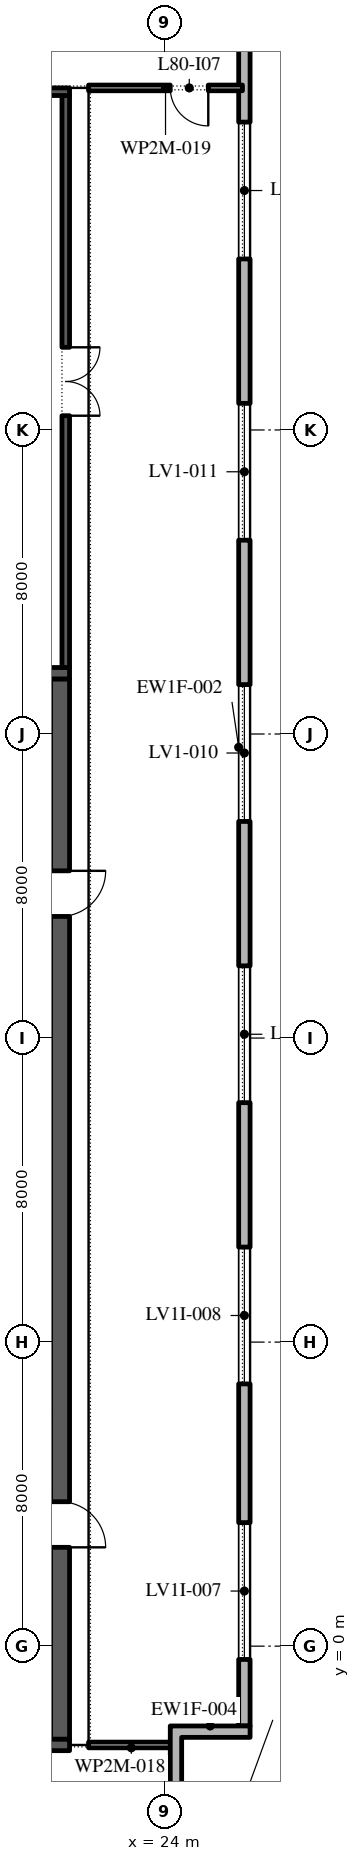
"""IFC4 building model, lengths in metres.
Left out: names, types, materials, properties, quantities, classifications, styles, units other than length and angle.
Written with IfcOpenShell. Run it as: python <this file> out.ifc"""

import sys

from ifc_helpers import new_model, si_unit, direction, frame, frame_2d, origin, place, context, subcontext, project, spatial, polyline, rectangle, outline, extrude, element, fill, save


model = new_model("IFC4")
c1 = context("Model", 3, precision=1e-05, world=origin(), true_north=direction((0.0, 1.0)))
c2 = subcontext(c1, "Body", "Model", "MODEL_VIEW")
j1 = project(units=[si_unit("LENGTHUNIT", "METRE"), si_unit("PLANEANGLEUNIT", "RADIAN")], contexts=[c1])
p1 = place(None, origin())
s1 = spatial("IfcSite", under=j1, at=p1, CompositionType="ELEMENT")
p2 = place(p1, origin())
s2 = spatial("IfcBuilding", under=s1, at=p2, CompositionType="ELEMENT")
p3 = place(p2, frame((0.0, 0.0, 363.6)))
s3 = spatial("IfcBuildingStorey", under=s2, at=p3, CompositionType="ELEMENT", Elevation=363.6)
p4 = place(p3, frame((26.1, -2.1, 0.0), z_axis=(0.0, 0.0, 1.0), x_axis=(0.0, 1.0, 0.0)))
e1 = element("IfcWall", 1, at=p4, inside=s3, PredefinedType="STANDARD", context=c2, shape_type="SweptSolid", body=[
    extrude(rectangle(XDim=51.5, YDim=0.3, at=frame_2d((25.75, 0.0))), origin(), (0.0, 0.0, 1.0), 5.2),
])
p5 = place(p4, frame((1.75, 0.0, 0.6)))
e2 = element("IfcOpeningElement", 2, at=p5, cuts=e1, PredefinedType="OPENING", context=c2, shape_type="SweptSolid", body=[
    extrude(rectangle(XDim=3.6, YDim=4.1, at=frame_2d((1.8, 2.05))), frame((0.0, 0.16, 0.0), z_axis=(0.0, -1.0, 0.0), x_axis=(1.0, 0.0, 0.0)), (0.0, 0.0, 1.0), 0.32),
])
p6 = place(p4, frame((9.0, 0.0, 0.6)))
e3 = element("IfcOpeningElement", 3, at=p6, cuts=e1, PredefinedType="OPENING", context=c2, shape_type="SweptSolid", body=[
    extrude(rectangle(XDim=3.6, YDim=4.1, at=frame_2d((1.8, 2.05))), frame((0.0, 0.16, 0.0), z_axis=(0.0, -1.0, 0.0), x_axis=(1.0, 0.0, 0.0)), (0.0, 0.0, 1.0), 0.32),
])
p7 = place(p4, frame((16.4, 0.0, 0.6)))
e4 = element("IfcOpeningElement", 4, at=p7, cuts=e1, PredefinedType="OPENING", context=c2, shape_type="SweptSolid", body=[
    extrude(rectangle(XDim=3.6, YDim=4.15, at=frame_2d((1.8, 2.075))), frame((0.0, 0.16, 0.0), z_axis=(0.0, -1.0, 0.0), x_axis=(1.0, 0.0, 0.0)), (0.0, 0.0, 1.0), 0.32),
])
p8 = place(p4, frame((23.8, 0.0, 0.6)))
e5 = element("IfcOpeningElement", 5, at=p8, cuts=e1, PredefinedType="OPENING", context=c2, shape_type="SweptSolid", body=[
    extrude(rectangle(XDim=3.6, YDim=4.15, at=frame_2d((1.8, 2.075))), frame((0.0, 0.16, 0.0), z_axis=(0.0, -1.0, 0.0), x_axis=(1.0, 0.0, 0.0)), (0.0, 0.0, 1.0), 0.32),
])
p9 = place(p4, frame((31.2, 0.0, 0.6)))
e6 = element("IfcOpeningElement", 6, at=p9, cuts=e1, PredefinedType="OPENING", context=c2, shape_type="SweptSolid", body=[
    extrude(rectangle(XDim=3.6, YDim=4.15, at=frame_2d((1.8, 2.075))), frame((0.0, 0.16, 0.0), z_axis=(0.0, -1.0, 0.0), x_axis=(1.0, 0.0, 0.0)), (0.0, 0.0, 1.0), 0.32),
])
p10 = place(p4, frame((38.6, 0.0, 0.6)))
e7 = element("IfcOpeningElement", 7, at=p10, cuts=e1, PredefinedType="OPENING", context=c2, shape_type="SweptSolid", body=[
    extrude(rectangle(XDim=3.6, YDim=4.15, at=frame_2d((1.8, 2.075))), frame((0.0, 0.16, 0.0), z_axis=(0.0, -1.0, 0.0), x_axis=(1.0, 0.0, 0.0)), (0.0, 0.0, 1.0), 0.32),
])
p11 = place(p4, frame((46.0, 0.0, 0.6)))
e8 = element("IfcOpeningElement", 8, at=p11, cuts=e1, PredefinedType="OPENING", context=c2, shape_type="SweptSolid", body=[
    extrude(rectangle(XDim=3.6, YDim=4.15, at=frame_2d((1.8, 2.075))), frame((0.0, 0.16, 0.0), z_axis=(0.0, -1.0, 0.0), x_axis=(1.0, 0.0, 0.0)), (0.0, 0.0, 1.0), 0.32),
])
p12 = place(p3, origin())
e9 = element("IfcWall", 9, at=p12, inside=s3, PredefinedType="STANDARD", context=c2, shape_type="SweptSolid", body=[
    extrude(outline(polyline([(24.15, -3.9), (24.15, -2.1), (26.25, -2.1), (26.25, -2.4), (24.45, -2.4), (24.45, -4.2), (22.65, -4.2), (22.65, -5.7), (22.35, -5.7), (22.35, -3.9), (24.15, -3.9)])), origin(), (0.0, 0.0, 1.0), 5.2),
])
p13 = place(p3, frame((21.25, -2.45, 0.0), z_axis=(0.0, 0.0, 1.0), x_axis=(0.0, 1.0, 0.0)))
e10 = element("IfcWall", 10, at=p13, inside=s3, PredefinedType="SHEAR", context=c2, shape_type="SweptSolid", body=[
    extrude(rectangle(XDim=27.9, YDim=0.5, at=frame_2d((13.95, 0.0))), origin(), (0.0, 0.0, 1.0), 5.2),
])
p14 = place(p13, frame((5.05, 0.0, 0.0)))
e11 = element("IfcOpeningElement", 11, at=p14, cuts=e10, PredefinedType="OPENING", context=c2, shape_type="SweptSolid", body=[
    extrude(rectangle(XDim=1.2, YDim=2.1, at=frame_2d((0.6, 1.05))), frame((0.0, 0.26, 0.0), z_axis=(0.0, -1.0, 0.0), x_axis=(1.0, 0.0, 0.0)), (0.0, 0.0, 1.0), 0.52),
])
p15 = place(p13, frame((21.65, 0.0, 0.0)))
e12 = element("IfcOpeningElement", 12, at=p15, cuts=e10, PredefinedType="OPENING", context=c2, shape_type="SweptSolid", body=[
    extrude(rectangle(XDim=1.2, YDim=2.1, at=frame_2d((0.6, 1.05))), frame((0.0, 0.26, 0.0), z_axis=(0.0, -1.0, 0.0), x_axis=(1.0, 0.0, 0.0)), (0.0, 0.0, 1.0), 0.52),
])
for number, where, z_axis, x_axis in (
    (13, (10.5, -2.6, 0.0), (0.0, 0.0, 1.0), (1.0, 0.0, 0.0)),
    (14, (10.5, 25.6, 0.0), (0.0, 0.0, 1.0), (1.0, 0.0, 0.0)),
):
    element("IfcWall", number, at=place(p3, frame(where, z_axis=z_axis, x_axis=x_axis)), inside=s3, PredefinedType="SHEAR", context=c2, shape_type="SweptSolid", body=[
        extrude(rectangle(XDim=11.0, YDim=0.3, at=frame_2d((5.5, 0.0))), origin(), (0.0, 0.0, 1.0), 5.2),
    ])
p16 = place(p3, frame((21.4, 25.75, 0.0), z_axis=(0.0, 0.0, 1.0), x_axis=(0.0, 1.0, 0.0)))
e15 = element("IfcWall", 15, at=p16, inside=s3, PredefinedType="SHEAR", context=c2, shape_type="SweptSolid", body=[
    extrude(rectangle(XDim=15.05, YDim=0.2, at=frame_2d((7.525, 0.0))), origin(), (0.0, 0.0, 1.0), 5.2),
])
p17 = place(p16, frame((6.625, 0.0, 0.0)))
e16 = element("IfcOpeningElement", 16, at=p17, cuts=e15, PredefinedType="OPENING", context=c2, shape_type="SweptSolid", body=[
    extrude(rectangle(XDim=1.8, YDim=2.4, at=frame_2d((0.9, 1.2))), frame((0.0, 0.11, 0.0), z_axis=(0.0, -1.0, 0.0), x_axis=(1.0, 0.0, 0.0)), (0.0, 0.0, 1.0), 0.22),
])
p18 = place(p3, frame((10.5, 40.9, 0.0), z_axis=(0.0, 0.0, 1.0), x_axis=(1.0, 0.0, 0.0)))
e17 = element("IfcWall", 17, at=p18, inside=s3, PredefinedType="SHEAR", context=c2, shape_type="SweptSolid", body=[
    extrude(rectangle(XDim=11.0, YDim=0.2, at=frame_2d((5.5, 0.0))), origin(), (0.0, 0.0, 1.0), 5.2),
])
p19 = place(p3, frame((22.0, -2.6, 0.0), z_axis=(0.0, 0.0, 1.0), x_axis=(1.0, 0.0, 0.0)))
e18 = element("IfcWall", 18, at=p19, inside=s3, PredefinedType="PARTITIONING", context=c2, shape_type="SweptSolid", body=[
    extrude(rectangle(XDim=2.25, YDim=0.15, at=frame_2d((1.125, 0.0))), origin(), (0.0, 0.0, 1.0), 5.2),
])
p20 = place(p3, frame((26.05, 41.0, 0.0), z_axis=(0.0, 0.0, 1.0), x_axis=(-1.0, 0.0, 0.0)))
e19 = element("IfcWall", 19, at=p20, inside=s3, PredefinedType="PARTITIONING", context=c2, shape_type="SweptSolid", body=[
    extrude(rectangle(XDim=4.05, YDim=0.15, at=frame_2d((2.025, 0.0))), origin(), (0.0, 0.0, 1.0), 5.2),
])
p21 = place(p20, frame((0.9, 0.0, 0.0)))
e20 = element("IfcOpeningElement", 20, at=p21, cuts=e19, PredefinedType="OPENING", context=c2, shape_type="SweptSolid", body=[
    extrude(rectangle(XDim=1.0, YDim=2.1, at=frame_2d((0.5, 1.05))), frame((0.0, 0.085, 0.0), z_axis=(0.0, -1.0, 0.0), x_axis=(1.0, 0.0, 0.0)), (0.0, 0.0, 1.0), 0.17),
])
p22 = place(p5, origin())
e21 = element("IfcWindow", 21, at=p22, inside=s3, PartitioningType="DOUBLE_PANEL_HORIZONTAL", PredefinedType="WINDOW", context=c2, shape_type="SweptSolid", body=[
    extrude(rectangle(XDim=3.6, YDim=4.1, at=frame_2d((1.8, 2.05))), frame((0.0, 0.03, 0.0), z_axis=(0.0, -1.0, 0.0), x_axis=(1.0, 0.0, 0.0)), (0.0, 0.0, 1.0), 0.06),
])
fill(e2, e21)
p23 = place(p6, origin())
e22 = element("IfcWindow", 22, at=p23, inside=s3, PartitioningType="DOUBLE_PANEL_HORIZONTAL", PredefinedType="WINDOW", context=c2, shape_type="SweptSolid", body=[
    extrude(rectangle(XDim=3.6, YDim=4.1, at=frame_2d((1.8, 2.05))), frame((0.0, 0.03, 0.0), z_axis=(0.0, -1.0, 0.0), x_axis=(1.0, 0.0, 0.0)), (0.0, 0.0, 1.0), 0.06),
])
fill(e3, e22)
p24 = place(p7, origin())
e23 = element("IfcWindow", 23, at=p24, inside=s3, PartitioningType="DOUBLE_PANEL_HORIZONTAL", PredefinedType="WINDOW", context=c2, shape_type="SweptSolid", body=[
    extrude(rectangle(XDim=3.6, YDim=4.15, at=frame_2d((1.8, 2.075))), frame((0.0, 0.03, 0.0), z_axis=(0.0, -1.0, 0.0), x_axis=(1.0, 0.0, 0.0)), (0.0, 0.0, 1.0), 0.06),
])
fill(e4, e23)
p25 = place(p8, origin())
e24 = element("IfcWindow", 24, at=p25, inside=s3, PartitioningType="DOUBLE_PANEL_HORIZONTAL", PredefinedType="WINDOW", context=c2, shape_type="SweptSolid", body=[
    extrude(rectangle(XDim=3.6, YDim=4.15, at=frame_2d((1.8, 2.075))), frame((0.0, 0.03, 0.0), z_axis=(0.0, -1.0, 0.0), x_axis=(1.0, 0.0, 0.0)), (0.0, 0.0, 1.0), 0.06),
])
fill(e5, e24)
p26 = place(p9, origin())
e25 = element("IfcWindow", 25, at=p26, inside=s3, PartitioningType="DOUBLE_PANEL_HORIZONTAL", PredefinedType="WINDOW", context=c2, shape_type="SweptSolid", body=[
    extrude(rectangle(XDim=3.6, YDim=4.15, at=frame_2d((1.8, 2.075))), frame((0.0, 0.03, 0.0), z_axis=(0.0, -1.0, 0.0), x_axis=(1.0, 0.0, 0.0)), (0.0, 0.0, 1.0), 0.06),
])
fill(e6, e25)
p27 = place(p10, origin())
e26 = element("IfcWindow", 26, at=p27, inside=s3, PartitioningType="DOUBLE_PANEL_HORIZONTAL", PredefinedType="WINDOW", context=c2, shape_type="SweptSolid", body=[
    extrude(rectangle(XDim=3.6, YDim=4.15, at=frame_2d((1.8, 2.075))), frame((0.0, 0.03, 0.0), z_axis=(0.0, -1.0, 0.0), x_axis=(1.0, 0.0, 0.0)), (0.0, 0.0, 1.0), 0.06),
])
fill(e7, e26)
p28 = place(p14, frame((1.2, 0.0, 0.0), z_axis=(0.0, 0.0, 1.0), x_axis=(-1.0, 0.0, 0.0)))
e27 = element("IfcDoor", 27, at=p28, inside=s3, OperationType="SINGLE_SWING_LEFT", PredefinedType="DOOR", context=c2, shape_type="SweptSolid", body=[
    extrude(rectangle(XDim=1.2, YDim=2.1, at=frame_2d((0.6, 1.05))), frame((0.0, 0.025, 0.0), z_axis=(0.0, -1.0, 0.0), x_axis=(1.0, 0.0, 0.0)), (0.0, 0.0, 1.0), 0.05),
])
fill(e11, e27)
p29 = place(p15, frame((1.2, 0.0, 0.0), z_axis=(0.0, 0.0, 1.0), x_axis=(-1.0, 0.0, 0.0)))
e28 = element("IfcDoor", 28, at=p29, inside=s3, OperationType="SINGLE_SWING_RIGHT", PredefinedType="DOOR", context=c2, shape_type="SweptSolid", body=[
    extrude(rectangle(XDim=1.2, YDim=2.1, at=frame_2d((0.6, 1.05))), frame((0.0, 0.025, 0.0), z_axis=(0.0, -1.0, 0.0), x_axis=(1.0, 0.0, 0.0)), (0.0, 0.0, 1.0), 0.05),
])
fill(e12, e28)
p30 = place(p17, frame((1.8, 0.15, 0.0), z_axis=(0.0, 0.0, 1.0), x_axis=(-1.0, 0.0, 0.0)))
e29 = element("IfcDoor", 29, at=p30, inside=s3, OperationType="DOUBLE_DOOR_SINGLE_SWING", PredefinedType="DOOR", context=c2, shape_type="SweptSolid", body=[
    extrude(rectangle(XDim=1.8, YDim=2.4, at=frame_2d((0.9, 1.2))), frame((0.0, 0.1, 0.0), z_axis=(0.0, -1.0, 0.0), x_axis=(1.0, 0.0, 0.0)), (0.0, 0.0, 1.0), 0.05),
])
fill(e16, e29)
p31 = place(p21, origin())
e30 = element("IfcDoor", 30, at=p31, inside=s3, OperationType="SINGLE_SWING_RIGHT", PredefinedType="DOOR", context=c2, shape_type="SweptSolid", body=[
    extrude(rectangle(XDim=1.0, YDim=2.1, at=frame_2d((0.5, 1.05))), frame((0.0, 0.025, 0.0), z_axis=(0.0, -1.0, 0.0), x_axis=(1.0, 0.0, 0.0)), (0.0, 0.0, 1.0), 0.05),
])
fill(e20, e30)
save(model, sys.argv[1])
